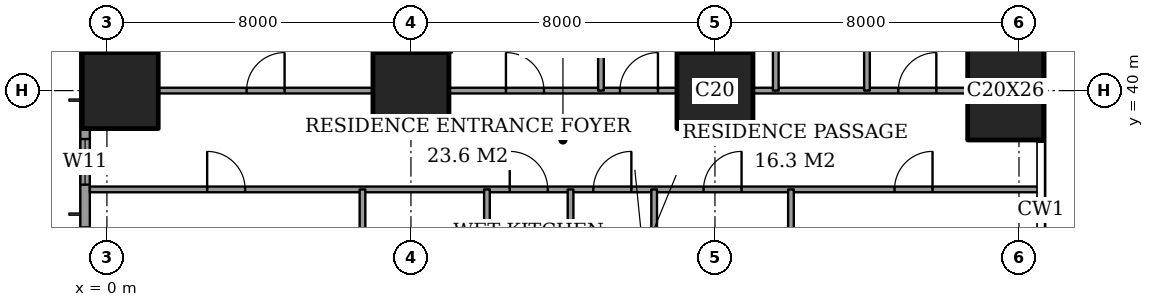
"""IFC4 building model, lengths in metres.
Left out: names, types, materials, properties, quantities, classifications, styles, units other than length and angle.
Written with IfcOpenShell. Run it as: python <this file> out.ifc"""

import sys

from ifc_helpers import new_model, si_unit, direction, frame, frame_2d, origin, origin_2d, place, context, subcontext, project, spatial, rectangle, extrude, element, fill, save


model = new_model("IFC4")
c1 = context("Model", 3, precision=1e-05, world=origin(), true_north=direction((0.0, 1.0)))
c2 = subcontext(c1, "Body", "Model", "MODEL_VIEW")
j1 = project(units=[si_unit("LENGTHUNIT", "METRE"), si_unit("PLANEANGLEUNIT", "RADIAN")], contexts=[c1])
p1 = place(None, origin())
s1 = spatial("IfcSite", under=j1, at=p1, CompositionType="ELEMENT")
p2 = place(p1, origin())
s2 = spatial("IfcBuilding", under=s1, at=p2, CompositionType="ELEMENT")
p3 = place(p2, frame((0.0, 0.0, 157.4)))
s3 = spatial("IfcBuildingStorey", under=s2, at=p3, CompositionType="ELEMENT", Elevation=157.4)
for number, where, z_axis, x_axis in (
    (1, (0.35, 40.0, 0.0), (0.0, 0.0, 1.0), (1.0, 0.0, 0.0)),
    (2, (8.0, 40.0, 0.0), (0.0, 0.0, 1.0), (1.0, 0.0, 0.0)),
    (3, (16.0, 40.0, 0.0), (0.0, 0.0, 1.0), (1.0, 0.0, 0.0)),
):
    element("IfcColumn", number, at=place(p3, frame(where, z_axis=z_axis, x_axis=x_axis)), inside=s3, PredefinedType="COLUMN", context=c2, shape_type="SweptSolid", body=[
        extrude(rectangle(XDim=2.0, YDim=2.0, at=origin_2d()), origin(), (0.0, 0.0, 1.0), 3.6),
    ])
p4 = place(p3, frame((23.65, 40.0, 0.0), z_axis=(0.0, 0.0, 1.0), x_axis=(1.0, 0.0, 0.0)))
e4 = element("IfcColumn", 4, at=p4, inside=s3, PredefinedType="COLUMN", context=c2, shape_type="SweptSolid", body=[
    extrude(rectangle(XDim=2.0, YDim=2.6, at=origin_2d()), origin(), (0.0, 0.0, 1.0), 3.6),
])
p5 = place(p3, frame((-0.575, 44.825, 0.0), z_axis=(0.0, 0.0, 1.0), x_axis=(0.0, -1.0, 0.0)))
e5 = element("IfcWall", 5, at=p5, inside=s3, PredefinedType="SOLIDWALL", context=c2, shape_type="SweptSolid", body=[
    extrude(rectangle(XDim=41.65, YDim=0.25, at=frame_2d((20.825, 0.0))), origin(), (0.0, 0.0, 1.0), 3.6),
])
p6 = place(p5, frame((0.775, 0.0, 0.4)))
e6 = element("IfcOpeningElement", 6, at=p6, cuts=e5, PredefinedType="OPENING", context=c2, shape_type="SweptSolid", body=[
    extrude(rectangle(XDim=2.4, YDim=2.2, at=frame_2d((1.2, 1.1))), frame((0.0, 0.135, 0.0), z_axis=(0.0, -1.0, 0.0), x_axis=(1.0, 0.0, 0.0)), (0.0, 0.0, 1.0), 0.27),
])
p7 = place(p5, frame((6.1, 0.0, 0.4)))
e7 = element("IfcOpeningElement", 7, at=p7, cuts=e5, PredefinedType="OPENING", context=c2, shape_type="SweptSolid", body=[
    extrude(rectangle(XDim=1.2, YDim=2.2, at=frame_2d((0.6, 1.1))), frame((0.0, 0.135, 0.0), z_axis=(0.0, -1.0, 0.0), x_axis=(1.0, 0.0, 0.0)), (0.0, 0.0, 1.0), 0.27),
])
p8 = place(p5, frame((8.425, 0.0, 0.4)))
e8 = element("IfcOpeningElement", 8, at=p8, cuts=e5, PredefinedType="OPENING", context=c2, shape_type="SweptSolid", body=[
    extrude(rectangle(XDim=2.4, YDim=2.2, at=frame_2d((1.2, 1.1))), frame((0.0, 0.135, 0.0), z_axis=(0.0, -1.0, 0.0), x_axis=(1.0, 0.0, 0.0)), (0.0, 0.0, 1.0), 0.27),
])
p9 = place(p5, frame((15.625, 0.0, 0.4)))
e9 = element("IfcOpeningElement", 9, at=p9, cuts=e5, PredefinedType="OPENING", context=c2, shape_type="SweptSolid", body=[
    extrude(rectangle(XDim=2.4, YDim=2.2, at=frame_2d((1.2, 1.1))), frame((0.0, 0.135, 0.0), z_axis=(0.0, -1.0, 0.0), x_axis=(1.0, 0.0, 0.0)), (0.0, 0.0, 1.0), 0.27),
])
p10 = place(p5, frame((23.625, 0.0, 0.4)))
e10 = element("IfcOpeningElement", 10, at=p10, cuts=e5, PredefinedType="OPENING", context=c2, shape_type="SweptSolid", body=[
    extrude(rectangle(XDim=2.4, YDim=2.2, at=frame_2d((1.2, 1.1))), frame((0.0, 0.135, 0.0), z_axis=(0.0, -1.0, 0.0), x_axis=(1.0, 0.0, 0.0)), (0.0, 0.0, 1.0), 0.27),
])
p11 = place(p5, frame((30.825, 0.0, 0.4)))
e11 = element("IfcOpeningElement", 11, at=p11, cuts=e5, PredefinedType="OPENING", context=c2, shape_type="SweptSolid", body=[
    extrude(rectangle(XDim=2.4, YDim=2.2, at=frame_2d((1.2, 1.1))), frame((0.0, 0.135, 0.0), z_axis=(0.0, -1.0, 0.0), x_axis=(1.0, 0.0, 0.0)), (0.0, 0.0, 1.0), 0.27),
])
p12 = place(p5, frame((34.5, 0.0, 0.4)))
e12 = element("IfcOpeningElement", 12, at=p12, cuts=e5, PredefinedType="OPENING", context=c2, shape_type="SweptSolid", body=[
    extrude(rectangle(XDim=1.2, YDim=2.2, at=frame_2d((0.6, 1.1))), frame((0.0, 0.135, 0.0), z_axis=(0.0, -1.0, 0.0), x_axis=(1.0, 0.0, 0.0)), (0.0, 0.0, 1.0), 0.27),
])
p13 = place(p5, frame((38.475, 0.0, 0.4)))
e13 = element("IfcOpeningElement", 13, at=p13, cuts=e5, PredefinedType="OPENING", context=c2, shape_type="SweptSolid", body=[
    extrude(rectangle(XDim=2.4, YDim=2.2, at=frame_2d((1.2, 1.1))), frame((0.0, 0.135, 0.0), z_axis=(0.0, -1.0, 0.0), x_axis=(1.0, 0.0, 0.0)), (0.0, 0.0, 1.0), 0.27),
])
p14 = place(p3, frame((-0.45, 37.4, 0.0), z_axis=(0.0, 0.0, 1.0), x_axis=(1.0, 0.0, 0.0)))
e14 = element("IfcWall", 14, at=p14, inside=s3, PredefinedType="PARTITIONING", context=c2, shape_type="SweptSolid", body=[
    extrude(rectangle(XDim=25.011, YDim=0.15, at=frame_2d((12.505, 0.0))), origin(), (0.0, 0.0, 1.0), 3.35),
])
p15 = place(p14, frame((13.25, 0.0, 0.0)))
e15 = element("IfcOpeningElement", 15, at=p15, cuts=e14, PredefinedType="OPENING", context=c2, shape_type="SweptSolid", body=[
    extrude(rectangle(XDim=1.0, YDim=2.1, at=frame_2d((0.5, 1.05))), frame((0.0, 0.085, 0.0), z_axis=(0.0, -1.0, 0.0), x_axis=(1.0, 0.0, 0.0)), (0.0, 0.0, 1.0), 0.17),
])
p16 = place(p14, frame((3.087, 0.0, 0.0)))
e16 = element("IfcOpeningElement", 16, at=p16, cuts=e14, PredefinedType="OPENING", context=c2, shape_type="SweptSolid", body=[
    extrude(rectangle(XDim=1.0, YDim=2.1, at=frame_2d((0.5, 1.05))), frame((0.0, 0.085, 0.0), z_axis=(0.0, -1.0, 0.0), x_axis=(1.0, 0.0, 0.0)), (0.0, 0.0, 1.0), 0.17),
])
p17 = place(p14, frame((11.05, 0.0, 0.0)))
e17 = element("IfcOpeningElement", 17, at=p17, cuts=e14, PredefinedType="OPENING", context=c2, shape_type="SweptSolid", body=[
    extrude(rectangle(XDim=1.0, YDim=2.1, at=frame_2d((0.5, 1.05))), frame((0.0, 0.085, 0.0), z_axis=(0.0, -1.0, 0.0), x_axis=(1.0, 0.0, 0.0)), (0.0, 0.0, 1.0), 0.17),
])
p18 = place(p14, frame((16.15, 0.0, 0.0)))
e18 = element("IfcOpeningElement", 18, at=p18, cuts=e14, PredefinedType="OPENING", context=c2, shape_type="SweptSolid", body=[
    extrude(rectangle(XDim=1.0, YDim=2.1, at=frame_2d((0.5, 1.05))), frame((0.0, 0.085, 0.0), z_axis=(0.0, -1.0, 0.0), x_axis=(1.0, 0.0, 0.0)), (0.0, 0.0, 1.0), 0.17),
])
p19 = place(p14, frame((21.175, 0.0, 0.0)))
e19 = element("IfcOpeningElement", 19, at=p19, cuts=e14, PredefinedType="OPENING", context=c2, shape_type="SweptSolid", body=[
    extrude(rectangle(XDim=1.0, YDim=2.1, at=frame_2d((0.5, 1.05))), frame((0.0, 0.085, 0.0), z_axis=(0.0, -1.0, 0.0), x_axis=(1.0, 0.0, 0.0)), (0.0, 0.0, 1.0), 0.17),
])
p20 = place(p3, frame((1.35, 40.0, 0.0), z_axis=(0.0, 0.0, 1.0), x_axis=(1.0, 0.0, 0.0)))
e20 = element("IfcWall", 20, at=p20, inside=s3, PredefinedType="PARTITIONING", context=c2, shape_type="SweptSolid", body=[
    extrude(rectangle(XDim=5.65, YDim=0.15, at=frame_2d((2.825, 0.0))), origin(), (0.0, 0.0, 1.0), 3.35),
])
p21 = place(p20, frame((2.325, 0.0, 0.0)))
e21 = element("IfcOpeningElement", 21, at=p21, cuts=e20, PredefinedType="OPENING", context=c2, shape_type="SweptSolid", body=[
    extrude(rectangle(XDim=1.0, YDim=2.1, at=frame_2d((0.5, 1.05))), frame((0.0, 0.085, 0.0), z_axis=(0.0, -1.0, 0.0), x_axis=(1.0, 0.0, 0.0)), (0.0, 0.0, 1.0), 0.17),
])
p22 = place(p3, frame((9.0, 40.0, 0.0), z_axis=(0.0, 0.0, 1.0), x_axis=(1.0, 0.0, 0.0)))
e22 = element("IfcWall", 22, at=p22, inside=s3, PredefinedType="PARTITIONING", context=c2, shape_type="SweptSolid", body=[
    extrude(rectangle(XDim=6.0, YDim=0.15, at=frame_2d((3.0, 0.0))), origin(), (0.0, 0.0, 1.0), 3.35),
])
p23 = place(p22, frame((1.5, 0.0, 0.0)))
e23 = element("IfcOpeningElement", 23, at=p23, cuts=e22, PredefinedType="OPENING", context=c2, shape_type="SweptSolid", body=[
    extrude(rectangle(XDim=1.0, YDim=2.1, at=frame_2d((0.5, 1.05))), frame((0.0, 0.085, 0.0), z_axis=(0.0, -1.0, 0.0), x_axis=(1.0, 0.0, 0.0)), (0.0, 0.0, 1.0), 0.17),
])
p24 = place(p22, frame((4.5, 0.0, 0.0)))
e24 = element("IfcOpeningElement", 24, at=p24, cuts=e22, PredefinedType="OPENING", context=c2, shape_type="SweptSolid", body=[
    extrude(rectangle(XDim=1.0, YDim=2.1, at=frame_2d((0.5, 1.05))), frame((0.0, 0.085, 0.0), z_axis=(0.0, -1.0, 0.0), x_axis=(1.0, 0.0, 0.0)), (0.0, 0.0, 1.0), 0.17),
])
p25 = place(p3, frame((17.0, 40.0, 0.0), z_axis=(0.0, 0.0, 1.0), x_axis=(1.0, 0.0, 0.0)))
e25 = element("IfcWall", 25, at=p25, inside=s3, PredefinedType="PARTITIONING", context=c2, shape_type="SweptSolid", body=[
    extrude(rectangle(XDim=5.65, YDim=0.15, at=frame_2d((2.825, 0.0))), origin(), (0.0, 0.0, 1.0), 3.35),
])
p26 = place(p25, frame((3.825, 0.0, 0.0)))
e26 = element("IfcOpeningElement", 26, at=p26, cuts=e25, PredefinedType="OPENING", context=c2, shape_type="SweptSolid", body=[
    extrude(rectangle(XDim=1.0, YDim=2.1, at=frame_2d((0.5, 1.05))), frame((0.0, 0.085, 0.0), z_axis=(0.0, -1.0, 0.0), x_axis=(1.0, 0.0, 0.0)), (0.0, 0.0, 1.0), 0.17),
])
p27 = place(p3, frame((6.725, 33.2, 0.0), z_axis=(0.0, 0.0, 1.0), x_axis=(0.0, 1.0, 0.0)))
e27 = element("IfcWall", 27, at=p27, inside=s3, PredefinedType="PARTITIONING", context=c2, shape_type="SweptSolid", body=[
    extrude(rectangle(XDim=4.2, YDim=0.15, at=frame_2d((2.1, 0.0))), origin(), (0.0, 0.0, 1.0), 3.35),
])
p28 = place(p27, frame((2.1, 0.0, 0.0)))
e28 = element("IfcOpeningElement", 28, at=p28, cuts=e27, PredefinedType="OPENING", context=c2, shape_type="SweptSolid", body=[
    extrude(rectangle(XDim=0.9, YDim=2.1, at=frame_2d((0.45, 1.05))), frame((0.0, 0.085, 0.0), z_axis=(0.0, -1.0, 0.0), x_axis=(1.0, 0.0, 0.0)), (0.0, 0.0, 1.0), 0.17),
])
p29 = place(p3, frame((10.0, 28.0, 0.0), z_axis=(0.0, 0.0, 1.0), x_axis=(0.0, 1.0, 0.0)))
e29 = element("IfcWall", 29, at=p29, inside=s3, PredefinedType="PARTITIONING", context=c2, shape_type="SweptSolid", body=[
    extrude(rectangle(XDim=9.4, YDim=0.15, at=frame_2d((4.7, 0.0))), origin(), (0.0, 0.0, 1.0), 3.35),
])
p30 = place(p29, frame((0.5, 0.0, 0.0)))
e30 = element("IfcOpeningElement", 30, at=p30, cuts=e29, PredefinedType="OPENING", context=c2, shape_type="SweptSolid", body=[
    extrude(rectangle(XDim=1.0, YDim=2.1, at=frame_2d((0.5, 1.05))), frame((0.0, 0.085, 0.0), z_axis=(0.0, -1.0, 0.0), x_axis=(1.0, 0.0, 0.0)), (0.0, 0.0, 1.0), 0.17),
])
p31 = place(p3, frame((12.2, 30.0, 0.0), z_axis=(0.0, 0.0, 1.0), x_axis=(0.0, 1.0, 0.0)))
e31 = element("IfcWall", 31, at=p31, inside=s3, PredefinedType="PARTITIONING", context=c2, shape_type="SweptSolid", body=[
    extrude(rectangle(XDim=7.4, YDim=0.15, at=frame_2d((3.7, 0.0))), origin(), (0.0, 0.0, 1.0), 3.35),
])
p32 = place(p3, frame((13.0, 40.0, 0.0), z_axis=(0.0, 0.0, 1.0), x_axis=(0.0, 1.0, 0.0)))
e32 = element("IfcWall", 32, at=p32, inside=s3, PredefinedType="PARTITIONING", context=c2, shape_type="SweptSolid", body=[
    extrude(rectangle(XDim=8.45, YDim=0.15, at=frame_2d((4.225, 0.0))), origin(), (0.0, 0.0, 1.0), 3.35),
])
p33 = place(p3, frame((14.4, 30.0, 0.0), z_axis=(0.0, 0.0, 1.0), x_axis=(0.0, 1.0, 0.0)))
e33 = element("IfcWall", 33, at=p33, inside=s3, PredefinedType="PARTITIONING", context=c2, shape_type="SweptSolid", body=[
    extrude(rectangle(XDim=7.4, YDim=0.15, at=frame_2d((3.7, 0.0))), origin(), (0.0, 0.0, 1.0), 3.35),
])
p34 = place(p3, frame((17.6, 40.0, 0.0), z_axis=(0.0, 0.0, 1.0), x_axis=(0.0, 1.0, 0.0)))
e34 = element("IfcWall", 34, at=p34, inside=s3, PredefinedType="PARTITIONING", context=c2, shape_type="SweptSolid", body=[
    extrude(rectangle(XDim=8.45, YDim=0.15, at=frame_2d((4.225, 0.0))), origin(), (0.0, 0.0, 1.0), 3.35),
])
p35 = place(p3, frame((18.0, 32.0, 0.0), z_axis=(0.0, 0.0, 1.0), x_axis=(0.0, 1.0, 0.0)))
e35 = element("IfcWall", 35, at=p35, inside=s3, PredefinedType="PARTITIONING", context=c2, shape_type="SweptSolid", body=[
    extrude(rectangle(XDim=5.4, YDim=0.15, at=frame_2d((2.7, 0.0))), origin(), (0.0, 0.0, 1.0), 3.35),
])
p36 = place(p3, frame((20.0, 40.0, 0.0), z_axis=(0.0, 0.0, 1.0), x_axis=(0.0, 1.0, 0.0)))
e36 = element("IfcWall", 36, at=p36, inside=s3, PredefinedType="PARTITIONING", context=c2, shape_type="SweptSolid", body=[
    extrude(rectangle(XDim=8.45, YDim=0.15, at=frame_2d((4.225, 0.0))), origin(), (0.0, 0.0, 1.0), 3.35),
])
p37 = place(p36, frame((3.775, 0.0, 0.0)))
e37 = element("IfcOpeningElement", 37, at=p37, cuts=e36, PredefinedType="OPENING", context=c2, shape_type="SweptSolid", body=[
    extrude(rectangle(XDim=0.9, YDim=2.1, at=frame_2d((0.45, 1.05))), frame((0.0, 0.085, 0.0), z_axis=(0.0, -1.0, 0.0), x_axis=(1.0, 0.0, 0.0)), (0.0, 0.0, 1.0), 0.17),
])
p38 = place(p7, origin())
e38 = element("IfcWindow", 38, at=p38, inside=s3, PartitioningType="SINGLE_PANEL", PredefinedType="WINDOW", context=c2, shape_type="SweptSolid", body=[
    extrude(rectangle(XDim=1.2, YDim=2.2, at=frame_2d((0.6, 1.1))), frame((0.0, 0.03, 0.0), z_axis=(0.0, -1.0, 0.0), x_axis=(1.0, 0.0, 0.0)), (0.0, 0.0, 1.0), 0.06),
])
fill(e7, e38)
p39 = place(p21, origin())
e39 = element("IfcDoor", 39, at=p39, inside=s3, OperationType="SINGLE_SWING_LEFT", PredefinedType="DOOR", context=c2, shape_type="SweptSolid", body=[
    extrude(rectangle(XDim=1.0, YDim=2.1, at=frame_2d((0.5, 1.05))), frame((0.0, 0.025, 0.0), z_axis=(0.0, -1.0, 0.0), x_axis=(1.0, 0.0, 0.0)), (0.0, 0.0, 1.0), 0.05),
])
fill(e21, e39)
p40 = place(p23, origin())
e40 = element("IfcDoor", 40, at=p40, inside=s3, OperationType="SINGLE_SWING_RIGHT", PredefinedType="DOOR", context=c2, shape_type="SweptSolid", body=[
    extrude(rectangle(XDim=1.0, YDim=2.1, at=frame_2d((0.5, 1.05))), frame((0.0, 0.025, 0.0), z_axis=(0.0, -1.0, 0.0), x_axis=(1.0, 0.0, 0.0)), (0.0, 0.0, 1.0), 0.05),
])
fill(e23, e40)
p41 = place(p24, origin())
e41 = element("IfcDoor", 41, at=p41, inside=s3, OperationType="SINGLE_SWING_LEFT", PredefinedType="DOOR", context=c2, shape_type="SweptSolid", body=[
    extrude(rectangle(XDim=1.0, YDim=2.1, at=frame_2d((0.5, 1.05))), frame((0.0, 0.025, 0.0), z_axis=(0.0, -1.0, 0.0), x_axis=(1.0, 0.0, 0.0)), (0.0, 0.0, 1.0), 0.05),
])
fill(e24, e41)
p42 = place(p26, origin())
e42 = element("IfcDoor", 42, at=p42, inside=s3, OperationType="SINGLE_SWING_LEFT", PredefinedType="DOOR", context=c2, shape_type="SweptSolid", body=[
    extrude(rectangle(XDim=1.0, YDim=2.1, at=frame_2d((0.5, 1.05))), frame((0.0, 0.025, 0.0), z_axis=(0.0, -1.0, 0.0), x_axis=(1.0, 0.0, 0.0)), (0.0, 0.0, 1.0), 0.05),
])
fill(e26, e42)
p43 = place(p15, origin())
e43 = element("IfcDoor", 43, at=p43, inside=s3, OperationType="SINGLE_SWING_LEFT", PredefinedType="DOOR", context=c2, shape_type="SweptSolid", body=[
    extrude(rectangle(XDim=1.0, YDim=2.1, at=frame_2d((0.5, 1.05))), frame((0.0, 0.025, 0.0), z_axis=(0.0, -1.0, 0.0), x_axis=(1.0, 0.0, 0.0)), (0.0, 0.0, 1.0), 0.05),
])
fill(e15, e43)
p44 = place(p16, origin())
e44 = element("IfcDoor", 44, at=p44, inside=s3, OperationType="SINGLE_SWING_RIGHT", PredefinedType="DOOR", context=c2, shape_type="SweptSolid", body=[
    extrude(rectangle(XDim=1.0, YDim=2.1, at=frame_2d((0.5, 1.05))), frame((0.0, 0.025, 0.0), z_axis=(0.0, -1.0, 0.0), x_axis=(1.0, 0.0, 0.0)), (0.0, 0.0, 1.0), 0.05),
])
fill(e16, e44)
p45 = place(p17, origin())
e45 = element("IfcDoor", 45, at=p45, inside=s3, OperationType="SINGLE_SWING_RIGHT", PredefinedType="DOOR", context=c2, shape_type="SweptSolid", body=[
    extrude(rectangle(XDim=1.0, YDim=2.1, at=frame_2d((0.5, 1.05))), frame((0.0, 0.025, 0.0), z_axis=(0.0, -1.0, 0.0), x_axis=(1.0, 0.0, 0.0)), (0.0, 0.0, 1.0), 0.05),
])
fill(e17, e45)
p46 = place(p18, origin())
e46 = element("IfcDoor", 46, at=p46, inside=s3, OperationType="SINGLE_SWING_LEFT", PredefinedType="DOOR", context=c2, shape_type="SweptSolid", body=[
    extrude(rectangle(XDim=1.0, YDim=2.1, at=frame_2d((0.5, 1.05))), frame((0.0, 0.025, 0.0), z_axis=(0.0, -1.0, 0.0), x_axis=(1.0, 0.0, 0.0)), (0.0, 0.0, 1.0), 0.05),
])
fill(e18, e46)
p47 = place(p19, origin())
e47 = element("IfcDoor", 47, at=p47, inside=s3, OperationType="SINGLE_SWING_LEFT", PredefinedType="DOOR", context=c2, shape_type="SweptSolid", body=[
    extrude(rectangle(XDim=1.0, YDim=2.1, at=frame_2d((0.5, 1.05))), frame((0.0, 0.025, 0.0), z_axis=(0.0, -1.0, 0.0), x_axis=(1.0, 0.0, 0.0)), (0.0, 0.0, 1.0), 0.05),
])
fill(e19, e47)
save(model, sys.argv[1])
